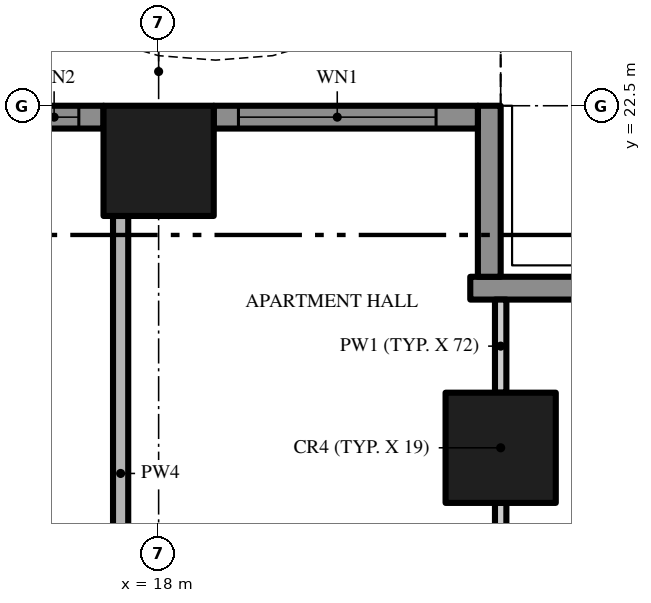
"""IFC4 building model, lengths in metres.
Left out: names, types, materials, properties, quantities, classifications, styles, units other than length and angle.
Written with IfcOpenShell. Run it as: python <this file> out.ifc"""

import sys

from ifc_helpers import new_model, si_unit, direction, frame, frame_2d, origin, origin_2d, place, context, subcontext, project, spatial, polyline, rectangle, outline, extrude, element, fill, save


model = new_model("IFC4")
c1 = context("Model", 3, precision=1e-05, world=origin(), true_north=direction((0.0, 1.0)))
c2 = subcontext(c1, "Body", "Model", "MODEL_VIEW")
j1 = project(units=[si_unit("LENGTHUNIT", "METRE"), si_unit("PLANEANGLEUNIT", "RADIAN")], contexts=[c1])
p1 = place(None, origin())
s1 = spatial("IfcSite", under=j1, at=p1, CompositionType="ELEMENT")
p2 = place(p1, origin())
s2 = spatial("IfcBuilding", under=s1, at=p2, CompositionType="ELEMENT")
p3 = place(p2, frame((0.0, 0.0, 30.2)))
s3 = spatial("IfcBuildingStorey", under=s2, at=p3, CompositionType="ELEMENT", Elevation=30.2)
for number, where, z_axis, x_axis in (
    (1, (18.0, 21.775, 0.0), (0.0, 0.0, 1.0), (1.0, 0.0, 0.0)),
    (2, (22.5, 18.0, 0.0), (0.0, 0.0, 1.0), (1.0, 0.0, 0.0)),
):
    element("IfcColumn", number, at=place(p3, frame(where, z_axis=z_axis, x_axis=x_axis)), inside=s3, PredefinedType="COLUMN", context=c2, shape_type="SweptSolid", body=[
        extrude(rectangle(XDim=1.45, YDim=1.45, at=origin_2d()), origin(), (0.0, 0.0, 1.0), 3.5),
    ])
p4 = place(p3, frame((22.1, 20.1, 0.0), z_axis=(0.0, 0.0, 1.0), x_axis=(1.0, 0.0, 0.0)))
e3 = element("IfcWall", 3, at=p4, inside=s3, PredefinedType="SOLIDWALL", context=c2, shape_type="SweptSolid", body=[
    extrude(rectangle(XDim=2.35, YDim=0.3, at=frame_2d((1.175, 0.0))), origin(), (0.0, 0.0, 1.0), 3.5),
])
p5 = place(p3, frame((22.35, 22.5, 0.0), z_axis=(0.0, 0.0, 1.0), x_axis=(0.0, -1.0, 0.0)))
e4 = element("IfcWall", 4, at=p5, inside=s3, PredefinedType="SOLIDWALL", context=c2, shape_type="SweptSolid", body=[
    extrude(rectangle(XDim=2.25, YDim=0.3, at=frame_2d((1.125, 0.0))), origin(), (0.0, 0.0, 1.0), 3.5),
])
p6 = place(p3, frame((18.725, 22.35, 0.0), z_axis=(0.0, 0.0, 1.0), x_axis=(1.0, 0.0, 0.0)))
e5 = element("IfcWall", 5, at=p6, inside=s3, PredefinedType="SOLIDWALL", context=c2, shape_type="SweptSolid", body=[
    extrude(rectangle(XDim=3.475, YDim=0.3, at=frame_2d((1.738, 0.0))), origin(), (0.0, 0.0, 1.0), 3.5),
])
p7 = place(p6, frame((0.325, 0.0, 0.45)))
e6 = element("IfcOpeningElement", 6, at=p7, cuts=e5, PredefinedType="OPENING", context=c2, shape_type="SweptSolid", body=[
    extrude(rectangle(XDim=2.6, YDim=2.65, at=frame_2d((1.3, 1.325))), frame((0.0, 0.16, 0.0), z_axis=(0.0, -1.0, 0.0), x_axis=(1.0, 0.0, 0.0)), (0.0, 0.0, 1.0), 0.32),
])
p8 = place(p3, frame((13.5, 22.35, 0.0), z_axis=(0.0, 0.0, 1.0), x_axis=(1.0, 0.0, 0.0)))
e7 = element("IfcWall", 7, at=p8, inside=s3, PredefinedType="SOLIDWALL", context=c2, shape_type="SweptSolid", body=[
    extrude(rectangle(XDim=3.775, YDim=0.3, at=frame_2d((1.887, 0.0))), origin(), (0.0, 0.0, 1.0), 3.5),
])
p9 = place(p8, frame((2.8, 0.0, 0.45)))
e8 = element("IfcOpeningElement", 8, at=p9, cuts=e7, PredefinedType="OPENING", context=c2, shape_type="SweptSolid", body=[
    extrude(rectangle(XDim=0.65, YDim=2.65, at=frame_2d((0.325, 1.325))), frame((0.0, 0.16, 0.0), z_axis=(0.0, -1.0, 0.0), x_axis=(1.0, 0.0, 0.0)), (0.0, 0.0, 1.0), 0.32),
])
p10 = place(p8, frame((0.85, 0.0, 0.0)))
e9 = element("IfcOpeningElement", 9, at=p10, cuts=e7, PredefinedType="OPENING", context=c2, shape_type="SweptSolid", body=[
    extrude(rectangle(XDim=1.8, YDim=2.4, at=frame_2d((0.9, 1.2))), frame((0.0, 0.16, 0.0), z_axis=(0.0, -1.0, 0.0), x_axis=(1.0, 0.0, 0.0)), (0.0, 0.0, 1.0), 0.32),
])
p11 = place(p3, origin())
e10 = element("IfcWall", 10, at=p11, inside=s3, PredefinedType="USERDEFINED", context=c2, shape_type="SweptSolid", body=[
    extrude(outline(polyline([(22.5, 24.3), (21.0, 23.595), (19.5, 23.159), (18.75, 23.1), (18.0, 23.159), (16.5, 23.595), (15.0, 24.3), (13.5, 25.005), (13.394, 24.779), (14.894, 24.074), (16.411, 23.36), (17.955, 22.911), (18.75, 22.849), (19.545, 22.911), (21.089, 23.36), (22.606, 24.074), (22.5, 24.3)])), origin(), (0.0, 0.0, 1.0), 0.9),
])
p12 = place(p3, frame((17.5, 21.05, 0.0), z_axis=(0.0, 0.0, 1.0), x_axis=(0.0, -1.0, 0.0)))
e11 = element("IfcWall", 11, at=p12, inside=s3, PredefinedType="PARTITIONING", context=c2, shape_type="SweptSolid", body=[
    extrude(rectangle(XDim=6.775, YDim=0.2, at=frame_2d((3.388, 0.0))), origin(), (0.0, 0.0, 1.0), 3.5),
])
p13 = place(p12, frame((4.725, 0.0, 0.0)))
e12 = element("IfcOpeningElement", 12, at=p13, cuts=e11, PredefinedType="OPENING", context=c2, shape_type="SweptSolid", body=[
    extrude(rectangle(XDim=1.2, YDim=2.4, at=frame_2d((0.6, 1.2))), frame((0.0, 0.11, 0.0), z_axis=(0.0, -1.0, 0.0), x_axis=(1.0, 0.0, 0.0)), (0.0, 0.0, 1.0), 0.22),
])
p14 = place(p3, frame((22.5, 17.275, 0.0), z_axis=(0.0, 0.0, 1.0), x_axis=(0.0, -1.0, 0.0)))
e13 = element("IfcWall", 13, at=p14, inside=s3, PredefinedType="PARTITIONING", context=c2, shape_type="SweptSolid", body=[
    extrude(rectangle(XDim=17.175, YDim=0.15, at=frame_2d((8.588, 0.0))), origin(), (0.0, 0.0, 1.0), 3.5),
])
p15 = place(p14, frame((14.525, 0.0, 0.0)))
e14 = element("IfcOpeningElement", 14, at=p15, cuts=e13, PredefinedType="OPENING", context=c2, shape_type="SweptSolid", body=[
    extrude(rectangle(XDim=1.0, YDim=2.4, at=frame_2d((0.5, 1.2))), frame((0.0, 0.085, 0.0), z_axis=(0.0, -1.0, 0.0), x_axis=(1.0, 0.0, 0.0)), (0.0, 0.0, 1.0), 0.17),
])
p16 = place(p14, frame((8.925, 0.0, 0.0)))
e15 = element("IfcOpeningElement", 15, at=p16, cuts=e13, PredefinedType="OPENING", context=c2, shape_type="SweptSolid", body=[
    extrude(rectangle(XDim=1.0, YDim=2.4, at=frame_2d((0.5, 1.2))), frame((0.0, 0.085, 0.0), z_axis=(0.0, -1.0, 0.0), x_axis=(1.0, 0.0, 0.0)), (0.0, 0.0, 1.0), 0.17),
])
p17 = place(p14, frame((3.975, 0.0, 0.0)))
e16 = element("IfcOpeningElement", 16, at=p17, cuts=e13, PredefinedType="OPENING", context=c2, shape_type="SweptSolid", body=[
    extrude(rectangle(XDim=1.8, YDim=2.4, at=frame_2d((0.9, 1.2))), frame((0.0, 0.085, 0.0), z_axis=(0.0, -1.0, 0.0), x_axis=(1.0, 0.0, 0.0)), (0.0, 0.0, 1.0), 0.17),
])
p18 = place(p3, frame((22.5, 18.725, 0.0), z_axis=(0.0, 0.0, 1.0), x_axis=(0.0, 1.0, 0.0)))
e17 = element("IfcWall", 17, at=p18, inside=s3, PredefinedType="PARTITIONING", context=c2, shape_type="SweptSolid", body=[
    extrude(rectangle(XDim=1.225, YDim=0.15, at=frame_2d((0.613, 0.0))), origin(), (0.0, 0.0, 1.0), 3.5),
])
p19 = place(p7, origin())
e18 = element("IfcWindow", 18, at=p19, inside=s3, PartitioningType="SINGLE_PANEL", PredefinedType="WINDOW", context=c2, shape_type="SweptSolid", body=[
    extrude(rectangle(XDim=2.6, YDim=2.65, at=frame_2d((1.3, 1.325))), frame((0.0, 0.03, 0.0), z_axis=(0.0, -1.0, 0.0), x_axis=(1.0, 0.0, 0.0)), (0.0, 0.0, 1.0), 0.06),
])
fill(e6, e18)
p20 = place(p9, origin())
e19 = element("IfcWindow", 19, at=p20, inside=s3, PartitioningType="SINGLE_PANEL", PredefinedType="WINDOW", context=c2, shape_type="SweptSolid", body=[
    extrude(rectangle(XDim=0.65, YDim=2.65, at=frame_2d((0.325, 1.325))), frame((0.0, 0.03, 0.0), z_axis=(0.0, -1.0, 0.0), x_axis=(1.0, 0.0, 0.0)), (0.0, 0.0, 1.0), 0.06),
])
fill(e8, e19)
save(model, sys.argv[1])
